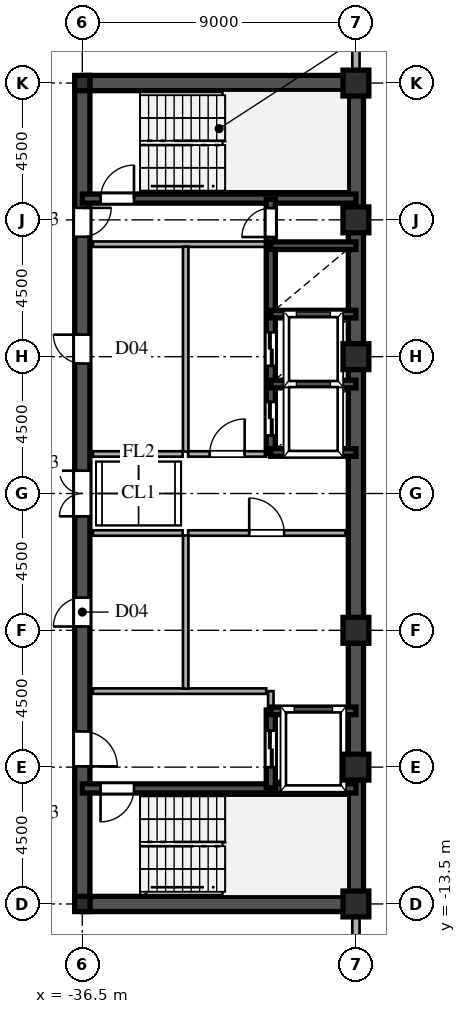
"""IFC4 building model, lengths in metres.
Left out: names, types, materials, properties, quantities, classifications, styles, units other than length and angle.
Written with IfcOpenShell. Run it as: python <this file> out.ifc"""

import sys

from ifc_helpers import new_model, si_unit, direction, frame, frame_2d, origin, origin_2d, place, context, subcontext, project, spatial, rectangle, hollow_rectangle, i_section, extrude, source, transform, mapped, element, fill, save


model = new_model("IFC4")
c1 = context("Model", 3, precision=1e-05, world=origin(), true_north=direction((0.0, 1.0)))
c2 = subcontext(c1, "Body", "Model", "MODEL_VIEW")
j1 = project(units=[si_unit("LENGTHUNIT", "METRE"), si_unit("PLANEANGLEUNIT", "RADIAN")], contexts=[c1])
p1 = place(None, origin())
s1 = spatial("IfcSite", under=j1, at=p1, CompositionType="ELEMENT")
p2 = place(p1, origin())
s2 = spatial("IfcBuilding", under=s1, at=p2, CompositionType="ELEMENT")
p3 = place(p2, frame((0.0, 0.0, 213.9)))
s3 = spatial("IfcBuildingStorey", under=s2, at=p3, CompositionType="ELEMENT", Elevation=213.9)
m1 = source(origin(), c2, "Body", "SweptSolid", [
    extrude(hollow_rectangle(XDim=0.85, YDim=0.85, WallThickness=0.036, at=origin_2d()), origin(), (0.0, 0.0, 1.0), 3.6),
])
for number, where, z_axis, x_axis in (
    (1, (-27.5, -13.5, 0.0), (0.0, 0.0, 1.0), (1.0, 0.0, 0.0)),
    (2, (-27.5, -9.0, 0.0), (0.0, 0.0, 1.0), (1.0, 0.0, 0.0)),
    (3, (-27.5, -4.5, 0.0), (0.0, 0.0, 1.0), (1.0, 0.0, 0.0)),
    (4, (-27.5, 4.5, 0.0), (0.0, 0.0, 1.0), (1.0, 0.0, 0.0)),
    (5, (-27.5, 9.0, 0.0), (0.0, 0.0, 1.0), (1.0, 0.0, 0.0)),
    (6, (-27.5, 13.5, 0.0), (0.0, 0.0, 1.0), (1.0, 0.0, 0.0)),
):
    element("IfcColumn", number, at=place(p3, frame(where, z_axis=z_axis, x_axis=x_axis)), inside=s3, PredefinedType="COLUMN", context=c2, shape_type="MappedRepresentation", body=[
        mapped(m1, transform((0.0, 0.0, 0.0), scale=1.0)),
    ])
m2 = source(origin(), c2, "Body", "SweptSolid", [
    extrude(i_section(OverallWidth=0.5, OverallDepth=0.5, WebThickness=0.02, FlangeThickness=0.032, at=origin_2d()), origin(), (0.0, 0.0, 1.0), 3.6),
])
for number, where, z_axis, x_axis in (
    (7, (-36.5, -13.5, 0.0), (0.0, 0.0, 1.0), (1.0, 0.0, 0.0)),
    (8, (-36.5, 13.5, 0.0), (0.0, 0.0, 1.0), (1.0, 0.0, 0.0)),
):
    element("IfcColumn", number, at=place(p3, frame(where, z_axis=z_axis, x_axis=x_axis)), inside=s3, PredefinedType="COLUMN", context=c2, shape_type="MappedRepresentation", body=[
        mapped(m2, transform((0.0, 0.0, 0.0), scale=1.0)),
    ])
p4 = place(p3, frame((-27.5, -15.98, 0.0), z_axis=(0.0, 0.0, 1.0), x_axis=(0.0, 1.0, 0.0)))
e9 = element("IfcWall", 9, at=p4, inside=s3, PredefinedType="SOLIDWALL", context=c2, shape_type="SweptSolid", body=[
    extrude(rectangle(XDim=1.605, YDim=0.24, at=frame_2d((0.803, 0.0))), origin(), (0.0, 0.0, 1.0), 3.38),
])
for number, where, z_axis, x_axis in (
    (10, (-27.5, -14.375, 0.0), (0.0, 0.0, 1.0), (0.0, 1.0, 0.0)),
    (11, (-27.5, 13.755, 0.0), (0.0, 0.0, 1.0), (0.0, 1.0, 0.0)),
):
    element("IfcWall", number, at=place(p3, frame(where, z_axis=z_axis, x_axis=x_axis)), inside=s3, PredefinedType="SOLIDWALL", context=c2, shape_type="SweptSolid", body=[
        extrude(rectangle(XDim=0.62, YDim=0.24, at=frame_2d((0.31, 0.0))), origin(), (0.0, 0.0, 1.0), 2.88),
    ])
p5 = place(p3, frame((-27.5, 14.375, 0.0), z_axis=(0.0, 0.0, 1.0), x_axis=(0.0, 1.0, 0.0)))
e12 = element("IfcWall", 12, at=p5, inside=s3, PredefinedType="SOLIDWALL", context=c2, shape_type="SweptSolid", body=[
    extrude(rectangle(XDim=1.605, YDim=0.24, at=frame_2d((0.803, 0.0))), origin(), (0.0, 0.0, 1.0), 3.38),
])
for number, where, z_axis, x_axis in (
    (13, (-27.5, -13.5, 0.0), (0.0, 0.0, 1.0), (0.0, 1.0, 0.0)),
    (14, (-27.5, 1.3, 0.0), (0.0, 0.0, 1.0), (0.0, 1.0, 0.0)),
):
    element("IfcWall", number, at=place(p3, frame(where, z_axis=z_axis, x_axis=x_axis)), inside=s3, PredefinedType="SHEAR", context=c2, shape_type="SweptSolid", body=[
        extrude(rectangle(XDim=12.2, YDim=0.5, at=frame_2d((6.1, 0.0))), origin(), (0.0, 0.0, 1.0), 3.38),
    ])
p6 = place(p3, frame((-27.5, -1.3, 0.0), z_axis=(0.0, 0.0, 1.0), x_axis=(0.0, 1.0, 0.0)))
e15 = element("IfcWall", 15, at=p6, inside=s3, PredefinedType="SHEAR", context=c2, shape_type="SweptSolid", body=[
    extrude(rectangle(XDim=2.6, YDim=0.5, at=frame_2d((1.3, 0.0))), origin(), (0.0, 0.0, 1.0), 3.38),
])
for number, where, z_axis, x_axis in (
    (16, (-36.5, -13.5, 0.0), (0.0, 0.0, 1.0), (1.0, 0.0, 0.0)),
    (17, (-36.5, 13.5, 0.0), (0.0, 0.0, 1.0), (1.0, 0.0, 0.0)),
):
    element("IfcWall", number, at=place(p3, frame(where, z_axis=z_axis, x_axis=x_axis)), inside=s3, PredefinedType="SHEAR", context=c2, shape_type="SweptSolid", body=[
        extrude(rectangle(XDim=9.0, YDim=0.5, at=frame_2d((4.5, 0.0))), origin(), (0.0, 0.0, 1.0), 3.38),
    ])
p7 = place(p3, frame((-36.5, -13.65, 0.0), z_axis=(0.0, 0.0, 1.0), x_axis=(0.0, 1.0, 0.0)))
e18 = element("IfcWall", 18, at=p7, inside=s3, PredefinedType="SHEAR", context=c2, shape_type="SweptSolid", body=[
    extrude(rectangle(XDim=7.15, YDim=0.5, at=frame_2d((3.575, 0.0))), origin(), (0.0, 0.0, 1.0), 3.38),
])
p8 = place(p7, frame((4.675, 0.0, 0.0)))
e19 = element("IfcOpeningElement", 19, at=p8, cuts=e18, PredefinedType="OPENING", context=c2, shape_type="SweptSolid", body=[
    extrude(rectangle(XDim=1.15, YDim=2.2, at=frame_2d((0.575, 1.1))), frame((0.0, 0.26, 0.0), z_axis=(0.0, -1.0, 0.0), x_axis=(1.0, 0.0, 0.0)), (0.0, 0.0, 1.0), 0.52),
])
p9 = place(p3, frame((-36.5, -1.3, 0.0), z_axis=(0.0, 0.0, 1.0), x_axis=(0.0, 1.0, 0.0)))
e20 = element("IfcWall", 20, at=p9, inside=s3, PredefinedType="SHEAR", context=c2, shape_type="SweptSolid", body=[
    extrude(rectangle(XDim=2.6, YDim=0.5, at=frame_2d((1.3, 0.0))), origin(), (0.0, 0.0, 1.0), 3.38),
])
p10 = place(p9, frame((0.55, 0.0, 0.0)))
e21 = element("IfcOpeningElement", 21, at=p10, cuts=e20, PredefinedType="OPENING", context=c2, shape_type="SweptSolid", body=[
    extrude(rectangle(XDim=1.5, YDim=2.3, at=frame_2d((0.75, 1.15))), frame((0.0, 0.26, 0.0), z_axis=(0.0, -1.0, 0.0), x_axis=(1.0, 0.0, 0.0)), (0.0, 0.0, 1.0), 0.52),
])
p11 = place(p3, frame((-36.5, 8.2, 0.0), z_axis=(0.0, 0.0, 1.0), x_axis=(0.0, 1.0, 0.0)))
e22 = element("IfcWall", 22, at=p11, inside=s3, PredefinedType="SHEAR", context=c2, shape_type="SweptSolid", body=[
    extrude(rectangle(XDim=5.45, YDim=0.5, at=frame_2d((2.725, 0.0))), origin(), (0.0, 0.0, 1.0), 3.38),
])
p12 = place(p11, frame((0.245, 0.0, 0.0)))
e23 = element("IfcOpeningElement", 23, at=p12, cuts=e22, PredefinedType="OPENING", context=c2, shape_type="SweptSolid", body=[
    extrude(rectangle(XDim=0.95, YDim=2.15, at=frame_2d((0.475, 1.075))), frame((0.0, 0.26, 0.0), z_axis=(0.0, -1.0, 0.0), x_axis=(1.0, 0.0, 0.0)), (0.0, 0.0, 1.0), 0.52),
])
p13 = place(p3, frame((-36.5, -6.5, 0.0), z_axis=(0.0, 0.0, 1.0), x_axis=(0.0, 1.0, 0.0)))
e24 = element("IfcWall", 24, at=p13, inside=s3, PredefinedType="SHEAR", context=c2, shape_type="SweptSolid", body=[
    extrude(rectangle(XDim=5.2, YDim=0.5, at=frame_2d((2.6, 0.0))), origin(), (0.0, 0.0, 1.0), 3.38),
])
p14 = place(p13, frame((2.125, 0.0, 0.0)))
e25 = element("IfcOpeningElement", 25, at=p14, cuts=e24, PredefinedType="OPENING", context=c2, shape_type="SweptSolid", body=[
    extrude(rectangle(XDim=0.95, YDim=2.15, at=frame_2d((0.475, 1.075))), frame((0.0, 0.26, 0.0), z_axis=(0.0, -1.0, 0.0), x_axis=(1.0, 0.0, 0.0)), (0.0, 0.0, 1.0), 0.52),
])
p15 = place(p3, frame((-36.5, 1.3, 0.0), z_axis=(0.0, 0.0, 1.0), x_axis=(0.0, 1.0, 0.0)))
e26 = element("IfcWall", 26, at=p15, inside=s3, PredefinedType="SHEAR", context=c2, shape_type="SweptSolid", body=[
    extrude(rectangle(XDim=6.9, YDim=0.5, at=frame_2d((3.45, 0.0))), origin(), (0.0, 0.0, 1.0), 3.38),
])
p16 = place(p15, frame((2.975, 0.0, 0.0)))
e27 = element("IfcOpeningElement", 27, at=p16, cuts=e26, PredefinedType="OPENING", context=c2, shape_type="SweptSolid", body=[
    extrude(rectangle(XDim=0.95, YDim=2.15, at=frame_2d((0.475, 1.075))), frame((0.0, 0.26, 0.0), z_axis=(0.0, -1.0, 0.0), x_axis=(1.0, 0.0, 0.0)), (0.0, 0.0, 1.0), 0.52),
])
p17 = place(p3, frame((-36.5, -9.7, 0.0), z_axis=(0.0, 0.0, 1.0), x_axis=(1.0, 0.0, 0.0)))
e28 = element("IfcWall", 28, at=p17, inside=s3, PredefinedType="SHEAR", context=c2, shape_type="SweptSolid", body=[
    extrude(rectangle(XDim=9.0, YDim=0.3, at=frame_2d((4.5, 0.0))), origin(), (0.0, 0.0, 1.0), 3.38),
])
p18 = place(p17, frame((0.6, 0.0, 0.0)))
e29 = element("IfcOpeningElement", 29, at=p18, cuts=e28, PredefinedType="OPENING", context=c2, shape_type="SweptSolid", body=[
    extrude(rectangle(XDim=1.1, YDim=2.2, at=frame_2d((0.55, 1.1))), frame((0.0, 0.16, 0.0), z_axis=(0.0, -1.0, 0.0), x_axis=(1.0, 0.0, 0.0)), (0.0, 0.0, 1.0), 0.32),
])
p19 = place(p3, frame((-36.5, 9.7, 0.0), z_axis=(0.0, 0.0, 1.0), x_axis=(1.0, 0.0, 0.0)))
e30 = element("IfcWall", 30, at=p19, inside=s3, PredefinedType="SHEAR", context=c2, shape_type="SweptSolid", body=[
    extrude(rectangle(XDim=9.0, YDim=0.3, at=frame_2d((4.5, 0.0))), origin(), (0.0, 0.0, 1.0), 3.38),
])
p20 = place(p19, frame((0.6, 0.0, 0.0)))
e31 = element("IfcOpeningElement", 31, at=p20, cuts=e30, PredefinedType="OPENING", context=c2, shape_type="SweptSolid", body=[
    extrude(rectangle(XDim=1.1, YDim=2.2, at=frame_2d((0.55, 1.1))), frame((0.0, 0.16, 0.0), z_axis=(0.0, -1.0, 0.0), x_axis=(1.0, 0.0, 0.0)), (0.0, 0.0, 1.0), 0.32),
])
for number, where, z_axis, x_axis in (
    (32, (-30.3, -7.15, 0.0), (0.0, 0.0, 1.0), (1.0, 0.0, 0.0)),
    (33, (-30.3, 1.35, 0.0), (0.0, 0.0, 1.0), (1.0, 0.0, 0.0)),
    (34, (-30.3, 3.6, 0.0), (0.0, 0.0, 1.0), (1.0, 0.0, 0.0)),
    (35, (-30.3, 5.9, 0.0), (0.0, 0.0, 1.0), (1.0, 0.0, 0.0)),
    (36, (-30.3, 8.15, 0.0), (0.0, 0.0, 1.0), (1.0, 0.0, 0.0)),
):
    element("IfcWall", number, at=place(p3, frame(where, z_axis=z_axis, x_axis=x_axis)), inside=s3, PredefinedType="SHEAR", context=c2, shape_type="SweptSolid", body=[
        extrude(rectangle(XDim=2.8, YDim=0.25, at=frame_2d((1.4, 0.0))), origin(), (0.0, 0.0, 1.0), 3.38),
    ])
p21 = place(p3, frame((-30.3, -9.68, 0.0), z_axis=(0.0, 0.0, 1.0), x_axis=(0.0, 1.0, 0.0)))
e37 = element("IfcWall", 37, at=p21, inside=s3, PredefinedType="SHEAR", context=c2, shape_type="SweptSolid", body=[
    extrude(rectangle(XDim=2.56, YDim=0.3, at=frame_2d((1.28, 0.0))), origin(), (0.0, 0.0, 1.0), 3.38),
])
p22 = place(p21, frame((0.68, 0.0, 0.0)))
e38 = element("IfcOpeningElement", 38, at=p22, cuts=e37, PredefinedType="OPENING", context=c2, shape_type="SweptSolid", body=[
    extrude(rectangle(XDim=1.2, YDim=2.25, at=frame_2d((0.6, 1.125))), frame((0.0, 0.16, 0.0), z_axis=(0.0, -1.0, 0.0), x_axis=(1.0, 0.0, 0.0)), (0.0, 0.0, 1.0), 0.32),
])
p23 = place(p3, frame((-30.3, 1.32, 0.0), z_axis=(0.0, 0.0, 1.0), x_axis=(0.0, 1.0, 0.0)))
e39 = element("IfcWall", 39, at=p23, inside=s3, PredefinedType="SHEAR", context=c2, shape_type="SweptSolid", body=[
    extrude(rectangle(XDim=2.28, YDim=0.3, at=frame_2d((1.14, 0.0))), origin(), (0.0, 0.0, 1.0), 3.38),
])
p24 = place(p23, frame((0.59, 0.0, 0.0)))
e40 = element("IfcOpeningElement", 40, at=p24, cuts=e39, PredefinedType="OPENING", context=c2, shape_type="SweptSolid", body=[
    extrude(rectangle(XDim=1.1, YDim=2.2, at=frame_2d((0.55, 1.1))), frame((0.0, 0.16, 0.0), z_axis=(0.0, -1.0, 0.0), x_axis=(1.0, 0.0, 0.0)), (0.0, 0.0, 1.0), 0.32),
])
p25 = place(p3, frame((-30.3, 3.6, 0.0), z_axis=(0.0, 0.0, 1.0), x_axis=(0.0, 1.0, 0.0)))
e41 = element("IfcWall", 41, at=p25, inside=s3, PredefinedType="SHEAR", context=c2, shape_type="SweptSolid", body=[
    extrude(rectangle(XDim=2.3, YDim=0.3, at=frame_2d((1.15, 0.0))), origin(), (0.0, 0.0, 1.0), 3.38),
])
p26 = place(p25, frame((0.6, 0.0, 0.0)))
e42 = element("IfcOpeningElement", 42, at=p26, cuts=e41, PredefinedType="OPENING", context=c2, shape_type="SweptSolid", body=[
    extrude(rectangle(XDim=1.1, YDim=2.2, at=frame_2d((0.55, 1.1))), frame((0.0, 0.16, 0.0), z_axis=(0.0, -1.0, 0.0), x_axis=(1.0, 0.0, 0.0)), (0.0, 0.0, 1.0), 0.32),
])
p27 = place(p3, frame((-30.3, 5.9, 0.0), z_axis=(0.0, 0.0, 1.0), x_axis=(0.0, 1.0, 0.0)))
e43 = element("IfcWall", 43, at=p27, inside=s3, PredefinedType="SHEAR", context=c2, shape_type="SweptSolid", body=[
    extrude(rectangle(XDim=2.25, YDim=0.3, at=frame_2d((1.125, 0.0))), origin(), (0.0, 0.0, 1.0), 3.38),
])
p28 = place(p3, frame((-30.3, 8.15, 0.0), z_axis=(0.0, 0.0, 1.0), x_axis=(0.0, 1.0, 0.0)))
e44 = element("IfcWall", 44, at=p28, inside=s3, PredefinedType="SHEAR", context=c2, shape_type="SweptSolid", body=[
    extrude(rectangle(XDim=1.53, YDim=0.3, at=frame_2d((0.765, 0.0))), origin(), (0.0, 0.0, 1.0), 3.38),
])
p29 = place(p28, frame((0.285, 0.0, 0.0)))
e45 = element("IfcOpeningElement", 45, at=p29, cuts=e44, PredefinedType="OPENING", context=c2, shape_type="SweptSolid", body=[
    extrude(rectangle(XDim=0.95, YDim=2.15, at=frame_2d((0.475, 1.075))), frame((0.0, 0.16, 0.0), z_axis=(0.0, -1.0, 0.0), x_axis=(1.0, 0.0, 0.0)), (0.0, 0.0, 1.0), 0.32),
])
p30 = place(p3, frame((-36.15, -6.5, 0.0), z_axis=(0.0, 0.0, 1.0), x_axis=(1.0, 0.0, 0.0)))
e46 = element("IfcWall", 46, at=p30, inside=s3, PredefinedType="PARTITIONING", context=c2, shape_type="SweptSolid", body=[
    extrude(rectangle(XDim=5.7, YDim=0.18, at=frame_2d((2.85, 0.0))), origin(), (0.0, 0.0, 1.0), 3.38),
])
p31 = place(p3, frame((-30.3, -7.12, 0.0), z_axis=(0.0, 0.0, 1.0), x_axis=(0.0, 1.0, 0.0)))
e47 = element("IfcWall", 47, at=p31, inside=s3, PredefinedType="PARTITIONING", context=c2, shape_type="SweptSolid", body=[
    extrude(rectangle(XDim=0.62, YDim=0.18, at=frame_2d((0.31, 0.0))), origin(), (0.0, 0.0, 1.0), 3.38),
])
p32 = place(p3, frame((-36.15, 8.2, 0.0), z_axis=(0.0, 0.0, 1.0), x_axis=(1.0, 0.0, 0.0)))
e48 = element("IfcWall", 48, at=p32, inside=s3, PredefinedType="PARTITIONING", context=c2, shape_type="SweptSolid", body=[
    extrude(rectangle(XDim=5.7, YDim=0.18, at=frame_2d((2.85, 0.0))), origin(), (0.0, 0.0, 1.0), 3.38),
])
p33 = place(p3, frame((-33.1, -6.42, 0.0), z_axis=(0.0, 0.0, 1.0), x_axis=(0.0, 1.0, 0.0)))
e49 = element("IfcWall", 49, at=p33, inside=s3, PredefinedType="PARTITIONING", context=c2, shape_type="SweptSolid", body=[
    extrude(rectangle(XDim=5.04, YDim=0.18, at=frame_2d((2.52, 0.0))), origin(), (0.0, 0.0, 1.0), 3.38),
])
p34 = place(p3, frame((-33.1, 1.38, 0.0), z_axis=(0.0, 0.0, 1.0), x_axis=(0.0, 1.0, 0.0)))
e50 = element("IfcWall", 50, at=p34, inside=s3, PredefinedType="PARTITIONING", context=c2, shape_type="SweptSolid", body=[
    extrude(rectangle(XDim=6.74, YDim=0.18, at=frame_2d((3.37, 0.0))), origin(), (0.0, 0.0, 1.0), 3.38),
])
p35 = place(p3, frame((-33.02, -1.3, 0.0), z_axis=(0.0, 0.0, 1.0), x_axis=(1.0, 0.0, 0.0)))
e51 = element("IfcWall", 51, at=p35, inside=s3, PredefinedType="PARTITIONING", context=c2, shape_type="SweptSolid", body=[
    extrude(rectangle(XDim=5.17, YDim=0.18, at=frame_2d((2.585, 0.0))), origin(), (0.0, 0.0, 1.0), 3.38),
])
p36 = place(p35, frame((2.01, 0.0, 0.0)))
e52 = element("IfcOpeningElement", 52, at=p36, cuts=e51, PredefinedType="OPENING", context=c2, shape_type="SweptSolid", body=[
    extrude(rectangle(XDim=1.15, YDim=2.2, at=frame_2d((0.575, 1.1))), frame((0.0, 0.1, 0.0), z_axis=(0.0, -1.0, 0.0), x_axis=(1.0, 0.0, 0.0)), (0.0, 0.0, 1.0), 0.2),
])
p37 = place(p3, frame((-33.02, 1.3, 0.0), z_axis=(0.0, 0.0, 1.0), x_axis=(1.0, 0.0, 0.0)))
e53 = element("IfcWall", 53, at=p37, inside=s3, PredefinedType="PARTITIONING", context=c2, shape_type="SweptSolid", body=[
    extrude(rectangle(XDim=2.57, YDim=0.18, at=frame_2d((1.285, 0.0))), origin(), (0.0, 0.0, 1.0), 3.38),
])
p38 = place(p37, frame((0.71, 0.0, 0.0)))
e54 = element("IfcOpeningElement", 54, at=p38, cuts=e53, PredefinedType="OPENING", context=c2, shape_type="SweptSolid", body=[
    extrude(rectangle(XDim=1.15, YDim=2.2, at=frame_2d((0.575, 1.1))), frame((0.0, 0.1, 0.0), z_axis=(0.0, -1.0, 0.0), x_axis=(1.0, 0.0, 0.0)), (0.0, 0.0, 1.0), 0.2),
])
for number, where, z_axis, x_axis in (
    (55, (-36.15, -1.3, 0.0), (0.0, 0.0, 1.0), (1.0, 0.0, 0.0)),
    (56, (-36.15, 1.3, 0.0), (0.0, 0.0, 1.0), (1.0, 0.0, 0.0)),
):
    element("IfcWall", number, at=place(p3, frame(where, z_axis=z_axis, x_axis=x_axis)), inside=s3, PredefinedType="PARTITIONING", context=c2, shape_type="SweptSolid", body=[
        extrude(rectangle(XDim=2.95, YDim=0.18, at=frame_2d((1.475, 0.0))), origin(), (0.0, 0.0, 1.0), 3.38),
    ])
m3 = source(origin(), c2, "Body", "SweptSolid", [
    extrude(rectangle(XDim=1.15, YDim=2.2, at=frame_2d((0.575, 1.1))), frame((0.0, 0.025, 0.0), z_axis=(0.0, -1.0, 0.0), x_axis=(1.0, 0.0, 0.0)), (0.0, 0.0, 1.0), 0.05),
])
p39 = place(p8, frame((1.15, 0.0, 0.0), z_axis=(0.0, 0.0, 1.0), x_axis=(-1.0, 0.0, 0.0)))
e57 = element("IfcDoor", 57, at=p39, inside=s3, OperationType="SINGLE_SWING_LEFT", PredefinedType="DOOR", context=c2, shape_type="MappedRepresentation", body=[
    mapped(m3, transform((0.0, 0.0, 0.0), scale=1.0)),
])
fill(e19, e57)
m4 = source(origin(), c2, "Body", "SweptSolid", [
    extrude(rectangle(XDim=1.5, YDim=2.3, at=frame_2d((0.75, 1.15))), frame((0.0, 0.025, 0.0), z_axis=(0.0, -1.0, 0.0), x_axis=(1.0, 0.0, 0.0)), (0.0, 0.0, 1.0), 0.05),
])
p40 = place(p10, origin())
e58 = element("IfcDoor", 58, at=p40, inside=s3, OperationType="DOUBLE_SWING_LEFT", PredefinedType="DOOR", context=c2, shape_type="MappedRepresentation", body=[
    mapped(m4, transform((0.0, 0.0, 0.0), scale=1.0)),
])
fill(e21, e58)
m5 = source(origin(), c2, "Body", "SweptSolid", [
    extrude(rectangle(XDim=0.95, YDim=2.15, at=frame_2d((0.475, 1.075))), frame((0.0, 0.025, 0.0), z_axis=(0.0, -1.0, 0.0), x_axis=(1.0, 0.0, 0.0)), (0.0, 0.0, 1.0), 0.05),
])
p41 = place(p12, frame((0.95, 0.0, 0.0), z_axis=(0.0, 0.0, 1.0), x_axis=(-1.0, 0.0, 0.0)))
e59 = element("IfcDoor", 59, at=p41, inside=s3, OperationType="SINGLE_SWING_RIGHT", PredefinedType="DOOR", context=c2, shape_type="MappedRepresentation", body=[
    mapped(m5, transform((0.0, 0.0, 0.0), scale=1.0)),
])
fill(e23, e59)
p42 = place(p14, origin())
e60 = element("IfcDoor", 60, at=p42, inside=s3, OperationType="SINGLE_SWING_LEFT", PredefinedType="DOOR", context=c2, shape_type="MappedRepresentation", body=[
    mapped(m5, transform((0.0, 0.0, 0.0), scale=1.0)),
])
fill(e25, e60)
p43 = place(p16, origin())
e61 = element("IfcDoor", 61, at=p43, inside=s3, OperationType="SINGLE_SWING_RIGHT", PredefinedType="DOOR", context=c2, shape_type="MappedRepresentation", body=[
    mapped(m5, transform((0.0, 0.0, 0.0), scale=1.0)),
])
fill(e27, e61)
m6 = source(origin(), c2, "Body", "SweptSolid", [
    extrude(rectangle(XDim=1.1, YDim=2.2, at=frame_2d((0.55, 1.1))), frame((0.0, 0.025, 0.0), z_axis=(0.0, -1.0, 0.0), x_axis=(1.0, 0.0, 0.0)), (0.0, 0.0, 1.0), 0.05),
])
p44 = place(p18, frame((1.1, 0.0, 0.0), z_axis=(0.0, 0.0, 1.0), x_axis=(-1.0, 0.0, 0.0)))
e62 = element("IfcDoor", 62, at=p44, inside=s3, OperationType="SINGLE_SWING_LEFT", PredefinedType="DOOR", context=c2, shape_type="MappedRepresentation", body=[
    mapped(m6, transform((0.0, 0.0, 0.0), scale=1.0)),
])
fill(e29, e62)
p45 = place(p20, origin())
e63 = element("IfcDoor", 63, at=p45, inside=s3, OperationType="SINGLE_SWING_RIGHT", PredefinedType="DOOR", context=c2, shape_type="MappedRepresentation", body=[
    mapped(m6, transform((0.0, 0.0, 0.0), scale=1.0)),
])
fill(e31, e63)
m7 = source(origin(), c2, "Body", "SweptSolid", [
    extrude(rectangle(XDim=1.2, YDim=2.25, at=frame_2d((0.6, 1.125))), frame((0.0, 0.025, 0.0), z_axis=(0.0, -1.0, 0.0), x_axis=(1.0, 0.0, 0.0)), (0.0, 0.0, 1.0), 0.05),
])
p46 = place(p22, origin())
e64 = element("IfcDoor", 64, at=p46, inside=s3, OperationType="DOUBLE_DOOR_SLIDING", PredefinedType="DOOR", context=c2, shape_type="MappedRepresentation", body=[
    mapped(m7, transform((0.0, 0.0, 0.0), scale=1.0)),
])
fill(e38, e64)
m8 = source(origin(), c2, "Body", "SweptSolid", [
    extrude(rectangle(XDim=1.1, YDim=2.2, at=frame_2d((0.55, 1.1))), frame((0.0, 0.025, 0.0), z_axis=(0.0, -1.0, 0.0), x_axis=(1.0, 0.0, 0.0)), (0.0, 0.0, 1.0), 0.05),
])
p47 = place(p24, origin())
e65 = element("IfcDoor", 65, at=p47, inside=s3, OperationType="DOUBLE_DOOR_SLIDING", PredefinedType="DOOR", context=c2, shape_type="MappedRepresentation", body=[
    mapped(m8, transform((0.0, 0.0, 0.0), scale=1.0)),
])
fill(e40, e65)
p48 = place(p26, origin())
e66 = element("IfcDoor", 66, at=p48, inside=s3, OperationType="DOUBLE_DOOR_SLIDING", PredefinedType="DOOR", context=c2, shape_type="MappedRepresentation", body=[
    mapped(m8, transform((0.0, 0.0, 0.0), scale=1.0)),
])
fill(e42, e66)
p49 = place(p29, origin())
e67 = element("IfcDoor", 67, at=p49, inside=s3, OperationType="SINGLE_SWING_LEFT", PredefinedType="DOOR", context=c2, shape_type="MappedRepresentation", body=[
    mapped(m5, transform((0.0, 0.0, 0.0), scale=1.0)),
])
fill(e45, e67)
p50 = place(p36, origin())
e68 = element("IfcDoor", 68, at=p50, inside=s3, OperationType="SINGLE_SWING_LEFT", PredefinedType="DOOR", context=c2, shape_type="MappedRepresentation", body=[
    mapped(m3, transform((0.0, 0.0, 0.0), scale=1.0)),
])
fill(e52, e68)
p51 = place(p38, origin())
e69 = element("IfcDoor", 69, at=p51, inside=s3, OperationType="SINGLE_SWING_RIGHT", PredefinedType="DOOR", context=c2, shape_type="MappedRepresentation", body=[
    mapped(m3, transform((0.0, 0.0, 0.0), scale=1.0)),
])
fill(e54, e69)
save(model, sys.argv[1])
